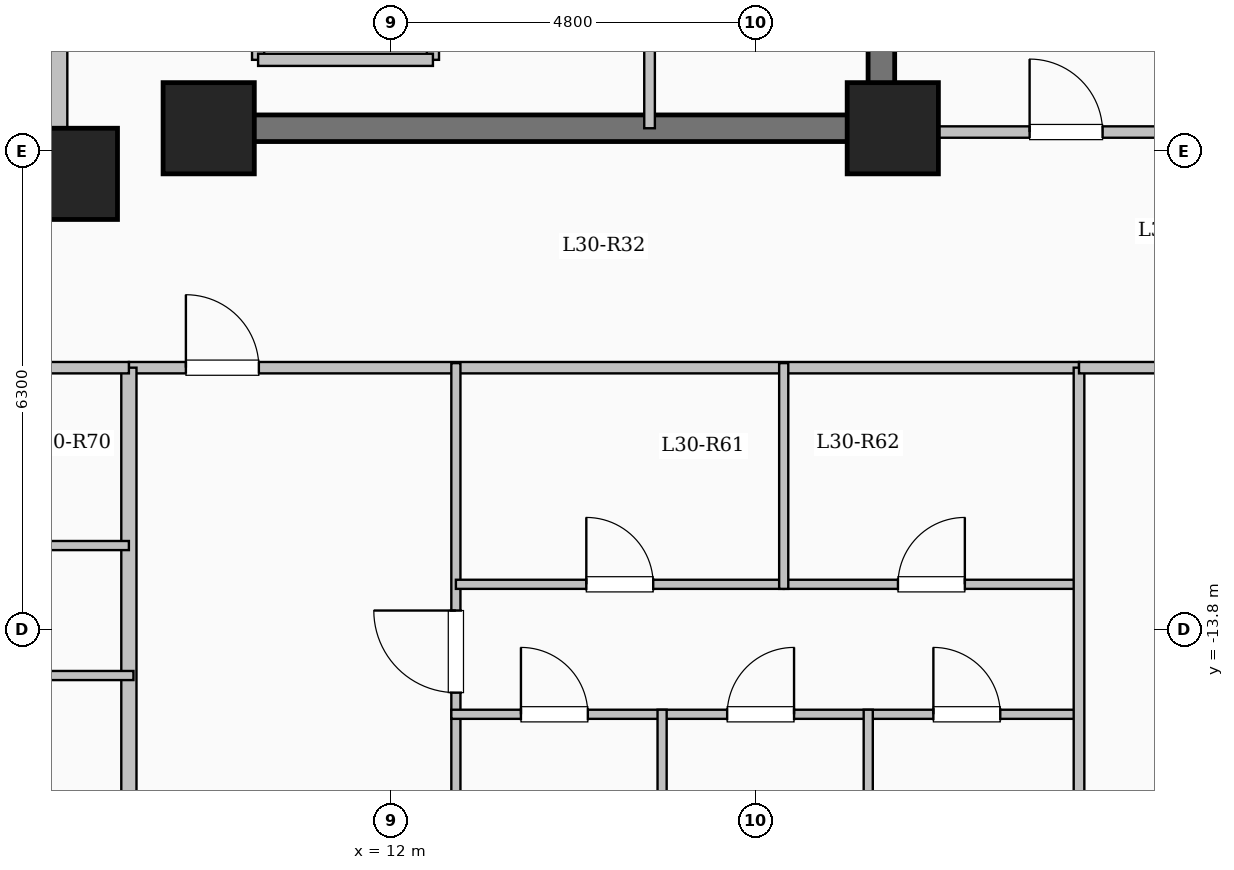
"""IFC4 building model, lengths in metres.
Left out: names, types, materials, properties, quantities, classifications, styles, units other than length and angle.
Written with IfcOpenShell. Run it as: python <this file> out.ifc"""

import sys

from ifc_helpers import new_model, si_unit, direction, frame, frame_2d, origin, origin_2d, place, context, subcontext, project, spatial, rectangle, extrude, element, fill, save


model = new_model("IFC4")
c1 = context("Model", 3, precision=1e-05, world=origin(), true_north=direction((0.0, 1.0)))
c2 = subcontext(c1, "Body", "Model", "MODEL_VIEW")
j1 = project(units=[si_unit("LENGTHUNIT", "METRE"), si_unit("PLANEANGLEUNIT", "RADIAN")], contexts=[c1])
p1 = place(None, origin())
s1 = spatial("IfcSite", under=j1, at=p1, CompositionType="ELEMENT")
p2 = place(p1, origin())
s2 = spatial("IfcBuilding", under=s1, at=p2, CompositionType="ELEMENT")
p3 = place(p2, frame((0.0, 0.0, 111.8)))
s3 = spatial("IfcBuildingStorey", under=s2, at=p3, CompositionType="ELEMENT", Elevation=111.8)
for number, where, z_axis, x_axis in (
    (1, (7.8, -7.8, 0.0), (0.0, 0.0, 1.0), (1.0, 0.0, 0.0)),
    (2, (9.6, -7.2, 0.0), (0.0, 0.0, 1.0), (1.0, 0.0, 0.0)),
    (3, (18.6, -7.2, 0.0), (0.0, 0.0, 1.0), (1.0, 0.0, 0.0)),
):
    element("IfcColumn", number, at=place(p3, frame(where, z_axis=z_axis, x_axis=x_axis)), inside=s3, PredefinedType="COLUMN", context=c2, shape_type="SweptSolid", body=[
        extrude(rectangle(XDim=1.2, YDim=1.2, at=origin_2d()), origin(), (0.0, 0.0, 1.0), 3.35),
    ])
p4 = place(p3, frame((-7.62, -7.62, 0.0), z_axis=(0.0, 0.0, 1.0), x_axis=(1.0, 0.0, 0.0)))
e4 = element("IfcWall", 4, at=p4, inside=s3, PredefinedType="SOLIDWALL", context=c2, shape_type="SweptSolid", body=[
    extrude(rectangle(XDim=15.24, YDim=0.24, at=frame_2d((7.62, 0.0))), origin(), (0.0, 0.0, 1.0), 3.1),
])
p5 = place(p4, frame((6.92, 0.0, 0.95)))
e5 = element("IfcOpeningElement", 5, at=p5, cuts=e4, PredefinedType="OPENING", context=c2, shape_type="SweptSolid", body=[
    extrude(rectangle(XDim=1.4, YDim=1.5, at=frame_2d((0.7, 0.75))), frame((0.0, 0.13, 0.0), z_axis=(0.0, -1.0, 0.0), x_axis=(1.0, 0.0, 0.0)), (0.0, 0.0, 1.0), 0.26),
])
p6 = place(p3, frame((7.62, -7.62, 0.0), z_axis=(0.0, 0.0, 1.0), x_axis=(0.0, 1.0, 0.0)))
e6 = element("IfcWall", 6, at=p6, inside=s3, PredefinedType="SOLIDWALL", context=c2, shape_type="SweptSolid", body=[
    extrude(rectangle(XDim=15.24, YDim=0.24, at=frame_2d((7.62, 0.0))), origin(), (0.0, 0.0, 1.0), 3.1),
])
p7 = place(p6, frame((6.92, 0.0, 0.95)))
e7 = element("IfcOpeningElement", 7, at=p7, cuts=e6, PredefinedType="OPENING", context=c2, shape_type="SweptSolid", body=[
    extrude(rectangle(XDim=1.4, YDim=1.5, at=frame_2d((0.7, 0.75))), frame((0.0, 0.13, 0.0), z_axis=(0.0, -1.0, 0.0), x_axis=(1.0, 0.0, 0.0)), (0.0, 0.0, 1.0), 0.26),
])
p8 = place(p3, frame((10.25, -6.3, 0.0), z_axis=(0.0, 0.0, 1.0), x_axis=(0.0, 1.0, 0.0)))
e8 = element("IfcWall", 8, at=p8, inside=s3, PredefinedType="SOLIDWALL", context=c2, shape_type="SweptSolid", body=[
    extrude(rectangle(XDim=2.6, YDim=0.16, at=frame_2d((1.3, 0.0))), origin(), (0.0, 0.0, 1.0), 3.1),
])
p9 = place(p8, frame((0.75, 0.0, 0.0)))
e9 = element("IfcOpeningElement", 9, at=p9, cuts=e8, PredefinedType="OPENING", context=c2, shape_type="SweptSolid", body=[
    extrude(rectangle(XDim=1.1, YDim=2.15, at=frame_2d((0.55, 1.075))), frame((0.0, 0.09, 0.0), z_axis=(0.0, -1.0, 0.0), x_axis=(1.0, 0.0, 0.0)), (0.0, 0.0, 1.0), 0.18),
])
p10 = place(p3, frame((12.55, -6.3, 0.0), z_axis=(0.0, 0.0, 1.0), x_axis=(0.0, 1.0, 0.0)))
e10 = element("IfcWall", 10, at=p10, inside=s3, PredefinedType="SOLIDWALL", context=c2, shape_type="SweptSolid", body=[
    extrude(rectangle(XDim=2.6, YDim=0.16, at=frame_2d((1.3, 0.0))), origin(), (0.0, 0.0, 1.0), 3.1),
])
p11 = place(p3, frame((10.25, -6.3, 0.0), z_axis=(0.0, 0.0, 1.0), x_axis=(1.0, 0.0, 0.0)))
e11 = element("IfcWall", 11, at=p11, inside=s3, PredefinedType="SOLIDWALL", context=c2, shape_type="SweptSolid", body=[
    extrude(rectangle(XDim=2.3, YDim=0.16, at=frame_2d((1.15, 0.0))), origin(), (0.0, 0.0, 1.0), 3.1),
])
p12 = place(p3, frame((18.45, -7.375, 0.0), z_axis=(0.0, 0.0, 1.0), x_axis=(0.0, 1.0, 0.0)))
e12 = element("IfcWall", 12, at=p12, inside=s3, PredefinedType="SHEAR", context=c2, shape_type="SweptSolid", body=[
    extrude(rectangle(XDim=14.05, YDim=0.35, at=frame_2d((7.025, 0.0))), origin(), (0.0, 0.0, 1.0), 3.35),
])
p13 = place(p3, frame((10.075, -7.2, 0.0), z_axis=(0.0, 0.0, 1.0), x_axis=(1.0, 0.0, 0.0)))
e13 = element("IfcWall", 13, at=p13, inside=s3, PredefinedType="SHEAR", context=c2, shape_type="SweptSolid", body=[
    extrude(rectangle(XDim=8.55, YDim=0.35, at=frame_2d((4.275, 0.0))), origin(), (0.0, 0.0, 1.0), 3.35),
])
p14 = place(p3, frame((15.4, -7.2, 0.0), z_axis=(0.0, 0.0, 1.0), x_axis=(0.0, 1.0, 0.0)))
e14 = element("IfcWall", 14, at=p14, inside=s3, PredefinedType="PARTITIONING", context=c2, shape_type="SweptSolid", body=[
    extrude(rectangle(XDim=10.45, YDim=0.14, at=frame_2d((5.225, 0.0))), origin(), (0.0, 0.0, 1.0), 3.1),
])
p15 = place(p14, frame((9.25, 0.0, 0.0)))
e15 = element("IfcOpeningElement", 15, at=p15, cuts=e14, PredefinedType="OPENING", context=c2, shape_type="SweptSolid", body=[
    extrude(rectangle(XDim=0.9, YDim=2.08, at=frame_2d((0.45, 1.04))), frame((0.0, 0.08, 0.0), z_axis=(0.0, -1.0, 0.0), x_axis=(1.0, 0.0, 0.0)), (0.0, 0.0, 1.0), 0.16),
])
p16 = place(p3, frame((8.55, -10.35, 0.0), z_axis=(0.0, 0.0, 1.0), x_axis=(1.0, 0.0, 0.0)))
e16 = element("IfcWall", 16, at=p16, inside=s3, PredefinedType="PARTITIONING", context=c2, shape_type="SweptSolid", body=[
    extrude(rectangle(XDim=12.5, YDim=0.15, at=frame_2d((6.25, 0.0))), origin(), (0.0, 0.0, 1.0), 3.1),
])
p17 = place(p16, frame((0.75, 0.0, 0.0)))
e17 = element("IfcOpeningElement", 17, at=p17, cuts=e16, PredefinedType="OPENING", context=c2, shape_type="SweptSolid", body=[
    extrude(rectangle(XDim=0.96, YDim=2.15, at=frame_2d((0.48, 1.075))), frame((0.0, 0.085, 0.0), z_axis=(0.0, -1.0, 0.0), x_axis=(1.0, 0.0, 0.0)), (0.0, 0.0, 1.0), 0.17),
])
p18 = place(p3, frame((12.852, -22.1, 0.0), z_axis=(0.0, 0.0, 1.0), x_axis=(0.0, 1.0, 0.0)))
e18 = element("IfcWall", 18, at=p18, inside=s3, PredefinedType="PARTITIONING", context=c2, shape_type="SweptSolid", body=[
    extrude(rectangle(XDim=11.81, YDim=0.12, at=frame_2d((5.905, 0.0))), origin(), (0.0, 0.0, 1.0), 3.1),
])
p19 = place(p18, frame((7.475, 0.0, 0.0)))
e19 = element("IfcOpeningElement", 19, at=p19, cuts=e18, PredefinedType="OPENING", context=c2, shape_type="SweptSolid", body=[
    extrude(rectangle(XDim=1.08, YDim=2.15, at=frame_2d((0.54, 1.075))), frame((0.0, 0.07, 0.0), z_axis=(0.0, -1.0, 0.0), x_axis=(1.0, 0.0, 0.0)), (0.0, 0.0, 1.0), 0.14),
])
p20 = place(p3, frame((12.852, -13.2, 0.0), z_axis=(0.0, 0.0, 1.0), x_axis=(1.0, 0.0, 0.0)))
e20 = element("IfcWall", 20, at=p20, inside=s3, PredefinedType="PARTITIONING", context=c2, shape_type="SweptSolid", body=[
    extrude(rectangle(XDim=4.313, YDim=0.12, at=frame_2d((2.156, 0.0))), origin(), (0.0, 0.0, 1.0), 3.1),
])
p21 = place(p20, frame((1.716, 0.0, 0.0)))
e21 = element("IfcOpeningElement", 21, at=p21, cuts=e20, PredefinedType="OPENING", context=c2, shape_type="SweptSolid", body=[
    extrude(rectangle(XDim=0.88, YDim=2.1, at=frame_2d((0.44, 1.05))), frame((0.0, 0.07, 0.0), z_axis=(0.0, -1.0, 0.0), x_axis=(1.0, 0.0, 0.0)), (0.0, 0.0, 1.0), 0.14),
])
p22 = place(p3, frame((17.165, -13.2, 0.0), z_axis=(0.0, 0.0, 1.0), x_axis=(1.0, 0.0, 0.0)))
e22 = element("IfcWall", 22, at=p22, inside=s3, PredefinedType="PARTITIONING", context=c2, shape_type="SweptSolid", body=[
    extrude(rectangle(XDim=3.885, YDim=0.12, at=frame_2d((1.942, 0.0))), origin(), (0.0, 0.0, 1.0), 3.1),
])
p23 = place(p22, frame((1.503, 0.0, 0.0)))
e23 = element("IfcOpeningElement", 23, at=p23, cuts=e22, PredefinedType="OPENING", context=c2, shape_type="SweptSolid", body=[
    extrude(rectangle(XDim=0.88, YDim=2.1, at=frame_2d((0.44, 1.05))), frame((0.0, 0.07, 0.0), z_axis=(0.0, -1.0, 0.0), x_axis=(1.0, 0.0, 0.0)), (0.0, 0.0, 1.0), 0.14),
])
p24 = place(p3, frame((12.792, -14.91, 0.0), z_axis=(0.0, 0.0, 1.0), x_axis=(1.0, 0.0, 0.0)))
e24 = element("IfcWall", 24, at=p24, inside=s3, PredefinedType="PARTITIONING", context=c2, shape_type="SweptSolid", body=[
    extrude(rectangle(XDim=8.318, YDim=0.12, at=frame_2d((4.159, 0.0))), origin(), (0.0, 0.0, 1.0), 3.1),
])
p25 = place(p24, frame((0.916, 0.0, 0.0)))
e25 = element("IfcOpeningElement", 25, at=p25, cuts=e24, PredefinedType="OPENING", context=c2, shape_type="SweptSolid", body=[
    extrude(rectangle(XDim=0.88, YDim=2.1, at=frame_2d((0.44, 1.05))), frame((0.0, 0.07, 0.0), z_axis=(0.0, -1.0, 0.0), x_axis=(1.0, 0.0, 0.0)), (0.0, 0.0, 1.0), 0.14),
])
p26 = place(p24, frame((3.629, 0.0, 0.0)))
e26 = element("IfcOpeningElement", 26, at=p26, cuts=e24, PredefinedType="OPENING", context=c2, shape_type="SweptSolid", body=[
    extrude(rectangle(XDim=0.88, YDim=2.1, at=frame_2d((0.44, 1.05))), frame((0.0, 0.07, 0.0), z_axis=(0.0, -1.0, 0.0), x_axis=(1.0, 0.0, 0.0)), (0.0, 0.0, 1.0), 0.14),
])
p27 = place(p24, frame((6.342, 0.0, 0.0)))
e27 = element("IfcOpeningElement", 27, at=p27, cuts=e24, PredefinedType="OPENING", context=c2, shape_type="SweptSolid", body=[
    extrude(rectangle(XDim=0.88, YDim=2.1, at=frame_2d((0.44, 1.05))), frame((0.0, 0.07, 0.0), z_axis=(0.0, -1.0, 0.0), x_axis=(1.0, 0.0, 0.0)), (0.0, 0.0, 1.0), 0.14),
])
p28 = place(p3, frame((17.165, -13.26, 0.0), z_axis=(0.0, 0.0, 1.0), x_axis=(0.0, 1.0, 0.0)))
e28 = element("IfcWall", 28, at=p28, inside=s3, PredefinedType="PARTITIONING", context=c2, shape_type="SweptSolid", body=[
    extrude(rectangle(XDim=2.97, YDim=0.12, at=frame_2d((1.485, 0.0))), origin(), (0.0, 0.0, 1.0), 3.1),
])
for number, where, z_axis, x_axis in (
    (29, (15.565, -22.1, 0.0), (0.0, 0.0, 1.0), (0.0, 1.0, 0.0)),
    (30, (18.277, -22.1, 0.0), (0.0, 0.0, 1.0), (0.0, 1.0, 0.0)),
):
    element("IfcWall", number, at=place(p3, frame(where, z_axis=z_axis, x_axis=x_axis)), inside=s3, PredefinedType="PARTITIONING", context=c2, shape_type="SweptSolid", body=[
        extrude(rectangle(XDim=7.25, YDim=0.12, at=frame_2d((3.625, 0.0))), origin(), (0.0, 0.0, 1.0), 3.1),
    ])
p29 = place(p3, frame((8.55, -22.704, 0.0), z_axis=(0.0, 0.0, 1.0), x_axis=(0.0, 1.0, 0.0)))
e31 = element("IfcWall", 31, at=p29, inside=s3, PredefinedType="SOLIDWALL", context=c2, shape_type="SweptSolid", body=[
    extrude(rectangle(XDim=12.354, YDim=0.2, at=frame_2d((6.177, 0.0))), origin(), (0.0, 0.0, 1.0), 3.1),
])
p30 = place(p3, frame((-8.55, -10.35, 0.0), z_axis=(0.0, 0.0, 1.0), x_axis=(1.0, 0.0, 0.0)))
e32 = element("IfcWall", 32, at=p30, inside=s3, PredefinedType="PARTITIONING", context=c2, shape_type="SweptSolid", body=[
    extrude(rectangle(XDim=17.1, YDim=0.15, at=frame_2d((8.55, 0.0))), origin(), (0.0, 0.0, 1.0), 3.1),
])
p31 = place(p30, frame((1.6, 0.0, 0.0)))
e33 = element("IfcOpeningElement", 33, at=p31, cuts=e32, PredefinedType="OPENING", context=c2, shape_type="SweptSolid", body=[
    extrude(rectangle(XDim=0.96, YDim=2.15, at=frame_2d((0.48, 1.075))), frame((0.0, 0.085, 0.0), z_axis=(0.0, -1.0, 0.0), x_axis=(1.0, 0.0, 0.0)), (0.0, 0.0, 1.0), 0.17),
])
p32 = place(p3, frame((4.104, -12.69, 0.0), z_axis=(0.0, 0.0, 1.0), x_axis=(1.0, 0.0, 0.0)))
e34 = element("IfcWall", 34, at=p32, inside=s3, PredefinedType="PARTITIONING", context=c2, shape_type="SweptSolid", body=[
    extrude(rectangle(XDim=4.446, YDim=0.12, at=frame_2d((2.223, 0.0))), origin(), (0.0, 0.0, 1.0), 2.635),
])
p33 = place(p32, frame((1.783, 0.0, 0.0)))
e35 = element("IfcOpeningElement", 35, at=p33, cuts=e34, PredefinedType="OPENING", context=c2, shape_type="SweptSolid", body=[
    extrude(rectangle(XDim=0.88, YDim=2.1, at=frame_2d((0.44, 1.05))), frame((0.0, 0.07, 0.0), z_axis=(0.0, -1.0, 0.0), x_axis=(1.0, 0.0, 0.0)), (0.0, 0.0, 1.0), 0.14),
])
p34 = place(p3, frame((-1.756, -14.4, 0.0), z_axis=(0.0, 0.0, 1.0), x_axis=(1.0, 0.0, 0.0)))
e36 = element("IfcWall", 36, at=p34, inside=s3, PredefinedType="PARTITIONING", context=c2, shape_type="SweptSolid", body=[
    extrude(rectangle(XDim=10.366, YDim=0.12, at=frame_2d((5.183, 0.0))), origin(), (0.0, 0.0, 1.0), 2.635),
])
p35 = place(p34, frame((1.256, 0.0, 0.0)))
e37 = element("IfcOpeningElement", 37, at=p35, cuts=e36, PredefinedType="OPENING", context=c2, shape_type="SweptSolid", body=[
    extrude(rectangle(XDim=0.88, YDim=2.1, at=frame_2d((0.44, 1.05))), frame((0.0, 0.07, 0.0), z_axis=(0.0, -1.0, 0.0), x_axis=(1.0, 0.0, 0.0)), (0.0, 0.0, 1.0), 0.14),
])
p36 = place(p34, frame((4.648, 0.0, 0.0)))
e38 = element("IfcOpeningElement", 38, at=p36, cuts=e36, PredefinedType="OPENING", context=c2, shape_type="SweptSolid", body=[
    extrude(rectangle(XDim=0.88, YDim=2.1, at=frame_2d((0.44, 1.05))), frame((0.0, 0.07, 0.0), z_axis=(0.0, -1.0, 0.0), x_axis=(1.0, 0.0, 0.0)), (0.0, 0.0, 1.0), 0.14),
])
p37 = place(p34, frame((8.04, 0.0, 0.0)))
e39 = element("IfcOpeningElement", 39, at=p37, cuts=e36, PredefinedType="OPENING", context=c2, shape_type="SweptSolid", body=[
    extrude(rectangle(XDim=0.88, YDim=2.1, at=frame_2d((0.44, 1.05))), frame((0.0, 0.07, 0.0), z_axis=(0.0, -1.0, 0.0), x_axis=(1.0, 0.0, 0.0)), (0.0, 0.0, 1.0), 0.14),
])
p38 = place(p3, frame((18.45, -7.25, 0.0), z_axis=(0.0, 0.0, 1.0), x_axis=(1.0, 0.0, 0.0)))
e40 = element("IfcWall", 40, at=p38, inside=s3, PredefinedType="PARTITIONING", context=c2, shape_type="SweptSolid", body=[
    extrude(rectangle(XDim=8.43, YDim=0.15, at=frame_2d((4.215, 0.0))), origin(), (0.0, 0.0, 1.0), 3.1),
])
p39 = place(p38, frame((1.95, 0.0, 0.0)))
e41 = element("IfcOpeningElement", 41, at=p39, cuts=e40, PredefinedType="OPENING", context=c2, shape_type="SweptSolid", body=[
    extrude(rectangle(XDim=0.96, YDim=2.15, at=frame_2d((0.48, 1.075))), frame((0.0, 0.085, 0.0), z_axis=(0.0, -1.0, 0.0), x_axis=(1.0, 0.0, 0.0)), (0.0, 0.0, 1.0), 0.17),
])
p40 = place(p3, frame((21.05, -17.85, 0.0), z_axis=(0.0, 0.0, 1.0), x_axis=(0.0, 1.0, 0.0)))
e42 = element("IfcWall", 42, at=p40, inside=s3, PredefinedType="PARTITIONING", context=c2, shape_type="SweptSolid", body=[
    extrude(rectangle(XDim=7.5, YDim=0.14, at=frame_2d((3.75, 0.0))), origin(), (0.0, 0.0, 1.0), 3.1),
])
p41 = place(p3, frame((21.05, -10.35, 0.0), z_axis=(0.0, 0.0, 1.0), x_axis=(1.0, 0.0, 0.0)))
e43 = element("IfcWall", 43, at=p41, inside=s3, PredefinedType="PARTITIONING", context=c2, shape_type="SweptSolid", body=[
    extrude(rectangle(XDim=5.83, YDim=0.15, at=frame_2d((2.915, 0.0))), origin(), (0.0, 0.0, 1.0), 3.1),
])
p42 = place(p41, frame((2.44, 0.0, 0.0)))
e44 = element("IfcOpeningElement", 44, at=p42, cuts=e43, PredefinedType="OPENING", context=c2, shape_type="SweptSolid", body=[
    extrude(rectangle(XDim=0.95, YDim=2.15, at=frame_2d((0.475, 1.075))), frame((0.0, 0.085, 0.0), z_axis=(0.0, -1.0, 0.0), x_axis=(1.0, 0.0, 0.0)), (0.0, 0.0, 1.0), 0.17),
])
p43 = place(p17, origin())
e45 = element("IfcDoor", 45, at=p43, inside=s3, OperationType="SINGLE_SWING_LEFT", PredefinedType="DOOR", context=c2, shape_type="SweptSolid", body=[
    extrude(rectangle(XDim=0.96, YDim=2.15, at=frame_2d((0.48, 1.075))), frame((0.0, 0.025, 0.0), z_axis=(0.0, -1.0, 0.0), x_axis=(1.0, 0.0, 0.0)), (0.0, 0.0, 1.0), 0.05),
])
fill(e17, e45)
p44 = place(p19, origin())
e46 = element("IfcDoor", 46, at=p44, inside=s3, OperationType="SINGLE_SWING_RIGHT", PredefinedType="DOOR", context=c2, shape_type="SweptSolid", body=[
    extrude(rectangle(XDim=1.08, YDim=2.15, at=frame_2d((0.54, 1.075))), frame((0.0, 0.025, 0.0), z_axis=(0.0, -1.0, 0.0), x_axis=(1.0, 0.0, 0.0)), (0.0, 0.0, 1.0), 0.05),
])
fill(e19, e46)
p45 = place(p21, origin())
e47 = element("IfcDoor", 47, at=p45, inside=s3, OperationType="SINGLE_SWING_LEFT", PredefinedType="DOOR", context=c2, shape_type="SweptSolid", body=[
    extrude(rectangle(XDim=0.88, YDim=2.1, at=frame_2d((0.44, 1.05))), frame((0.0, 0.025, 0.0), z_axis=(0.0, -1.0, 0.0), x_axis=(1.0, 0.0, 0.0)), (0.0, 0.0, 1.0), 0.05),
])
fill(e21, e47)
p46 = place(p23, origin())
e48 = element("IfcDoor", 48, at=p46, inside=s3, OperationType="SINGLE_SWING_RIGHT", PredefinedType="DOOR", context=c2, shape_type="SweptSolid", body=[
    extrude(rectangle(XDim=0.88, YDim=2.1, at=frame_2d((0.44, 1.05))), frame((0.0, 0.025, 0.0), z_axis=(0.0, -1.0, 0.0), x_axis=(1.0, 0.0, 0.0)), (0.0, 0.0, 1.0), 0.05),
])
fill(e23, e48)
p47 = place(p25, origin())
e49 = element("IfcDoor", 49, at=p47, inside=s3, OperationType="SINGLE_SWING_LEFT", PredefinedType="DOOR", context=c2, shape_type="SweptSolid", body=[
    extrude(rectangle(XDim=0.88, YDim=2.1, at=frame_2d((0.44, 1.05))), frame((0.0, 0.025, 0.0), z_axis=(0.0, -1.0, 0.0), x_axis=(1.0, 0.0, 0.0)), (0.0, 0.0, 1.0), 0.05),
])
fill(e25, e49)
p48 = place(p26, origin())
e50 = element("IfcDoor", 50, at=p48, inside=s3, OperationType="SINGLE_SWING_RIGHT", PredefinedType="DOOR", context=c2, shape_type="SweptSolid", body=[
    extrude(rectangle(XDim=0.88, YDim=2.1, at=frame_2d((0.44, 1.05))), frame((0.0, 0.025, 0.0), z_axis=(0.0, -1.0, 0.0), x_axis=(1.0, 0.0, 0.0)), (0.0, 0.0, 1.0), 0.05),
])
fill(e26, e50)
p49 = place(p27, origin())
e51 = element("IfcDoor", 51, at=p49, inside=s3, OperationType="SINGLE_SWING_LEFT", PredefinedType="DOOR", context=c2, shape_type="SweptSolid", body=[
    extrude(rectangle(XDim=0.88, YDim=2.1, at=frame_2d((0.44, 1.05))), frame((0.0, 0.025, 0.0), z_axis=(0.0, -1.0, 0.0), x_axis=(1.0, 0.0, 0.0)), (0.0, 0.0, 1.0), 0.05),
])
fill(e27, e51)
p50 = place(p39, origin())
e52 = element("IfcDoor", 52, at=p50, inside=s3, OperationType="SINGLE_SWING_LEFT", PredefinedType="DOOR", context=c2, shape_type="SweptSolid", body=[
    extrude(rectangle(XDim=0.96, YDim=2.15, at=frame_2d((0.48, 1.075))), frame((0.0, 0.025, 0.0), z_axis=(0.0, -1.0, 0.0), x_axis=(1.0, 0.0, 0.0)), (0.0, 0.0, 1.0), 0.05),
])
fill(e41, e52)
save(model, sys.argv[1])
